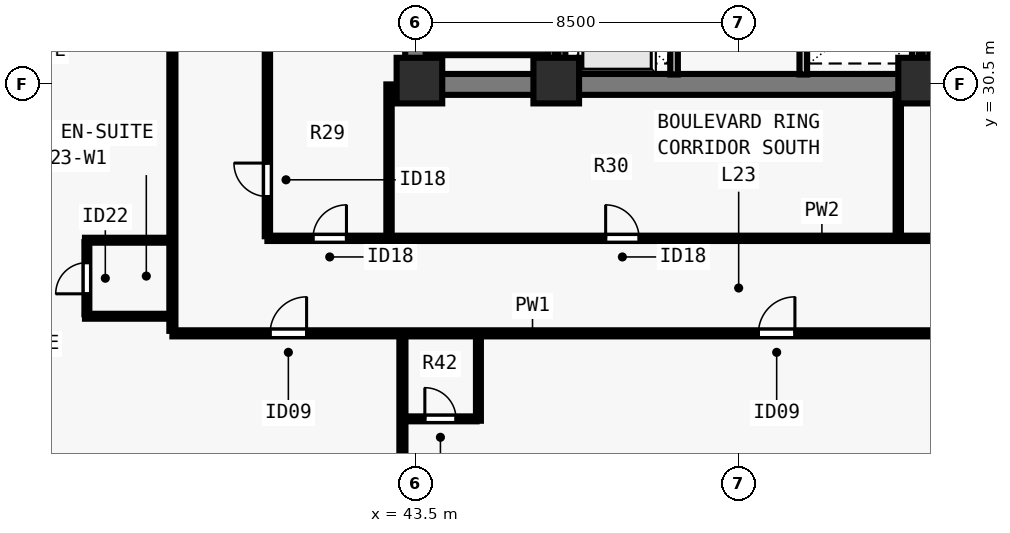
"""IFC4 building model, lengths in metres.
Left out: names, types, materials, properties, quantities, classifications, styles, units other than length and angle.
Written with IfcOpenShell. Run it as: python <this file> out.ifc"""

import sys

from ifc_helpers import new_model, si_unit, direction, frame, frame_2d, origin, origin_2d, place, context, subcontext, project, spatial, rectangle, extrude, element, fill, save


model = new_model("IFC4")
c1 = context("Model", 3, precision=1e-05, world=origin(), true_north=direction((0.0, 1.0)))
c2 = subcontext(c1, "Body", "Model", "MODEL_VIEW")
j1 = project(units=[si_unit("LENGTHUNIT", "METRE"), si_unit("PLANEANGLEUNIT", "RADIAN")], contexts=[c1])
p1 = place(None, origin())
s1 = spatial("IfcSite", under=j1, at=p1, CompositionType="ELEMENT")
p2 = place(p1, origin())
s2 = spatial("IfcBuilding", under=s1, at=p2, CompositionType="ELEMENT")
p3 = place(p2, frame((0.0, 0.0, 86.5)))
s3 = spatial("IfcBuildingStorey", under=s2, at=p3, CompositionType="ELEMENT", Elevation=86.5)
for number, where, z_axis, x_axis in (
    (1, (43.6, 30.6, 0.0), (0.0, 0.0, 1.0), (1.0, 0.0, 0.0)),
    (2, (47.2, 30.6, 0.0), (0.0, 0.0, 1.0), (1.0, 0.0, 0.0)),
    (3, (56.8, 30.6, 0.0), (0.0, 0.0, 1.0), (1.0, 0.0, 0.0)),
):
    element("IfcColumn", number, at=place(p3, frame(where, z_axis=z_axis, x_axis=x_axis)), inside=s3, PredefinedType="COLUMN", context=c2, shape_type="SweptSolid", body=[
        extrude(rectangle(XDim=1.2, YDim=1.2, at=origin_2d()), origin(), (0.0, 0.0, 1.0), 3.5),
    ])
p4 = place(p3, frame((43.225, 30.5, 0.0), z_axis=(0.0, 0.0, 1.0), x_axis=(1.0, 0.0, 0.0)))
e4 = element("IfcWall", 4, at=p4, inside=s3, PredefinedType="SHEAR", context=c2, shape_type="SweptSolid", body=[
    extrude(rectangle(XDim=17.55, YDim=0.55, at=frame_2d((8.775, 0.0))), origin(), (0.0, 0.0, 1.0), 3.28),
])
p5 = place(p3, frame((43.5, 30.765, 0.0), z_axis=(0.0, 0.0, 1.0), x_axis=(0.0, 1.0, 0.0)))
e5 = element("IfcWall", 5, at=p5, inside=s3, PredefinedType="SHEAR", context=c2, shape_type="SweptSolid", body=[
    extrude(rectangle(XDim=7.985, YDim=0.55, at=frame_2d((3.993, 0.0))), origin(), (0.0, 0.0, 1.0), 3.28),
])
p6 = place(p3, frame((50.3, 30.76, 0.0), z_axis=(0.0, 0.0, 1.0), x_axis=(0.0, 1.0, 0.0)))
e6 = element("IfcWall", 6, at=p6, inside=s3, PredefinedType="SOLIDWALL", context=c2, shape_type="SweptSolid", body=[
    extrude(rectangle(XDim=7.855, YDim=0.2, at=frame_2d((3.927, 0.0))), origin(), (0.0, 0.0, 1.0), 3.28),
])
p7 = place(p6, frame((0.79, 0.0, 0.0)))
e7 = element("IfcOpeningElement", 7, at=p7, cuts=e6, PredefinedType="OPENING", context=c2, shape_type="SweptSolid", body=[
    extrude(rectangle(XDim=1.1, YDim=2.2, at=frame_2d((0.55, 1.1))), frame((0.0, 0.11, 0.0), z_axis=(0.0, -1.0, 0.0), x_axis=(1.0, 0.0, 0.0)), (0.0, 0.0, 1.0), 0.22),
])
p8 = place(p6, frame((3.49, 0.0, 0.0)))
e8 = element("IfcOpeningElement", 8, at=p8, cuts=e6, PredefinedType="OPENING", context=c2, shape_type="SweptSolid", body=[
    extrude(rectangle(XDim=1.1, YDim=2.2, at=frame_2d((0.55, 1.1))), frame((0.0, 0.11, 0.0), z_axis=(0.0, -1.0, 0.0), x_axis=(1.0, 0.0, 0.0)), (0.0, 0.0, 1.0), 0.22),
])
p9 = place(p6, frame((6.19, 0.0, 0.0)))
e9 = element("IfcOpeningElement", 9, at=p9, cuts=e6, PredefinedType="OPENING", context=c2, shape_type="SweptSolid", body=[
    extrude(rectangle(XDim=1.1, YDim=2.2, at=frame_2d((0.55, 1.1))), frame((0.0, 0.11, 0.0), z_axis=(0.0, -1.0, 0.0), x_axis=(1.0, 0.0, 0.0)), (0.0, 0.0, 1.0), 0.22),
])
p10 = place(p3, frame((53.7, 30.76, 0.0), z_axis=(0.0, 0.0, 1.0), x_axis=(0.0, 1.0, 0.0)))
e10 = element("IfcWall", 10, at=p10, inside=s3, PredefinedType="SOLIDWALL", context=c2, shape_type="SweptSolid", body=[
    extrude(rectangle(XDim=7.855, YDim=0.2, at=frame_2d((3.927, 0.0))), origin(), (0.0, 0.0, 1.0), 3.28),
])
for number, where, z_axis, x_axis in (
    (11, (47.35, 30.76, 0.0), (0.0, 0.0, 1.0), (0.0, 1.0, 0.0)),
    (12, (56.65, 30.76, 0.0), (0.0, 0.0, 1.0), (0.0, 1.0, 0.0)),
):
    element("IfcWall", number, at=place(p3, frame(where, z_axis=z_axis, x_axis=x_axis)), inside=s3, PredefinedType="SOLIDWALL", context=c2, shape_type="SweptSolid", body=[
        extrude(rectangle(XDim=7.855, YDim=0.18, at=frame_2d((3.927, 0.0))), origin(), (0.0, 0.0, 1.0), 3.28),
    ])
p11 = place(p3, frame((37.1, 23.95, 0.0), z_axis=(0.0, 0.0, 1.0), x_axis=(1.0, 0.0, 0.0)))
e13 = element("IfcWall", 13, at=p11, inside=s3, PredefinedType="PARTITIONING", context=c2, shape_type="SweptSolid", body=[
    extrude(rectangle(XDim=29.8, YDim=0.16, at=frame_2d((14.9, 0.0))), origin(), (0.0, 0.0, 1.0), 3.28),
])
p12 = place(p11, frame((2.571, 0.0, 0.0)))
e14 = element("IfcOpeningElement", 14, at=p12, cuts=e13, PredefinedType="OPENING", context=c2, shape_type="SweptSolid", body=[
    extrude(rectangle(XDim=0.96, YDim=2.15, at=frame_2d((0.48, 1.075))), frame((0.0, 0.09, 0.0), z_axis=(0.0, -1.0, 0.0), x_axis=(1.0, 0.0, 0.0)), (0.0, 0.0, 1.0), 0.18),
])
p13 = place(p11, frame((15.42, 0.0, 0.0)))
e15 = element("IfcOpeningElement", 15, at=p13, cuts=e13, PredefinedType="OPENING", context=c2, shape_type="SweptSolid", body=[
    extrude(rectangle(XDim=0.96, YDim=2.15, at=frame_2d((0.48, 1.075))), frame((0.0, 0.09, 0.0), z_axis=(0.0, -1.0, 0.0), x_axis=(1.0, 0.0, 0.0)), (0.0, 0.0, 1.0), 0.18),
])
p14 = place(p11, frame((27.269, 0.0, 0.0)))
e16 = element("IfcOpeningElement", 16, at=p14, cuts=e13, PredefinedType="OPENING", context=c2, shape_type="SweptSolid", body=[
    extrude(rectangle(XDim=0.96, YDim=2.15, at=frame_2d((0.48, 1.075))), frame((0.0, 0.09, 0.0), z_axis=(0.0, -1.0, 0.0), x_axis=(1.0, 0.0, 0.0)), (0.0, 0.0, 1.0), 0.18),
])
p15 = place(p3, frame((37.1, 24.015, 0.0), z_axis=(0.0, 0.0, 1.0), x_axis=(0.0, 1.0, 0.0)))
e17 = element("IfcWall", 17, at=p15, inside=s3, PredefinedType="PARTITIONING", context=c2, shape_type="SweptSolid", body=[
    extrude(rectangle(XDim=29.97, YDim=0.16, at=frame_2d((14.985, 0.0))), origin(), (0.0, 0.0, 1.0), 3.28),
])
p16 = place(p15, frame((8.134, 0.0, 0.0)))
e18 = element("IfcOpeningElement", 18, at=p16, cuts=e17, PredefinedType="OPENING", context=c2, shape_type="SweptSolid", body=[
    extrude(rectangle(XDim=0.96, YDim=2.15, at=frame_2d((0.48, 1.075))), frame((0.0, 0.09, 0.0), z_axis=(0.0, -1.0, 0.0), x_axis=(1.0, 0.0, 0.0)), (0.0, 0.0, 1.0), 0.18),
])
p17 = place(p15, frame((22.934, 0.0, 0.0)))
e19 = element("IfcOpeningElement", 19, at=p17, cuts=e17, PredefinedType="OPENING", context=c2, shape_type="SweptSolid", body=[
    extrude(rectangle(XDim=0.96, YDim=2.15, at=frame_2d((0.48, 1.075))), frame((0.0, 0.09, 0.0), z_axis=(0.0, -1.0, 0.0), x_axis=(1.0, 0.0, 0.0)), (0.0, 0.0, 1.0), 0.18),
])
p18 = place(p3, frame((39.6, 26.45, 0.0), z_axis=(0.0, 0.0, 1.0), x_axis=(1.0, 0.0, 0.0)))
e20 = element("IfcWall", 20, at=p18, inside=s3, PredefinedType="PARTITIONING", context=c2, shape_type="SweptSolid", body=[
    extrude(rectangle(XDim=24.8, YDim=0.14, at=frame_2d((12.4, 0.0))), origin(), (0.0, 0.0, 1.0), 3.28),
])
p19 = place(p18, frame((1.2, 0.0, 0.0)))
e21 = element("IfcOpeningElement", 21, at=p19, cuts=e20, PredefinedType="OPENING", context=c2, shape_type="SweptSolid", body=[
    extrude(rectangle(XDim=0.88, YDim=2.1, at=frame_2d((0.44, 1.05))), frame((0.0, 0.08, 0.0), z_axis=(0.0, -1.0, 0.0), x_axis=(1.0, 0.0, 0.0)), (0.0, 0.0, 1.0), 0.16),
])
p20 = place(p18, frame((8.9, 0.0, 0.0)))
e22 = element("IfcOpeningElement", 22, at=p20, cuts=e20, PredefinedType="OPENING", context=c2, shape_type="SweptSolid", body=[
    extrude(rectangle(XDim=0.88, YDim=2.1, at=frame_2d((0.44, 1.05))), frame((0.0, 0.08, 0.0), z_axis=(0.0, -1.0, 0.0), x_axis=(1.0, 0.0, 0.0)), (0.0, 0.0, 1.0), 0.16),
])
p21 = place(p18, frame((19.4, 0.0, 0.0)))
e23 = element("IfcOpeningElement", 23, at=p21, cuts=e20, PredefinedType="OPENING", context=c2, shape_type="SweptSolid", body=[
    extrude(rectangle(XDim=0.88, YDim=2.1, at=frame_2d((0.44, 1.05))), frame((0.0, 0.08, 0.0), z_axis=(0.0, -1.0, 0.0), x_axis=(1.0, 0.0, 0.0)), (0.0, 0.0, 1.0), 0.16),
])
p22 = place(p3, frame((39.6, 26.505, 0.0), z_axis=(0.0, 0.0, 1.0), x_axis=(0.0, 1.0, 0.0)))
e24 = element("IfcWall", 24, at=p22, inside=s3, PredefinedType="PARTITIONING", context=c2, shape_type="SweptSolid", body=[
    extrude(rectangle(XDim=12.245, YDim=0.14, at=frame_2d((6.123, 0.0))), origin(), (0.0, 0.0, 1.0), 3.28),
])
p23 = place(p22, frame((1.045, 0.0, 0.0)))
e25 = element("IfcOpeningElement", 25, at=p23, cuts=e24, PredefinedType="OPENING", context=c2, shape_type="SweptSolid", body=[
    extrude(rectangle(XDim=0.88, YDim=2.1, at=frame_2d((0.44, 1.05))), frame((0.0, 0.08, 0.0), z_axis=(0.0, -1.0, 0.0), x_axis=(1.0, 0.0, 0.0)), (0.0, 0.0, 1.0), 0.16),
])
p24 = place(p22, frame((9.295, 0.0, 0.0)))
e26 = element("IfcOpeningElement", 26, at=p24, cuts=e24, PredefinedType="OPENING", context=c2, shape_type="SweptSolid", body=[
    extrude(rectangle(XDim=0.88, YDim=2.1, at=frame_2d((0.44, 1.05))), frame((0.0, 0.08, 0.0), z_axis=(0.0, -1.0, 0.0), x_axis=(1.0, 0.0, 0.0)), (0.0, 0.0, 1.0), 0.16),
])
p25 = place(p3, frame((42.8, 26.505, 0.0), z_axis=(0.0, 0.0, 1.0), x_axis=(0.0, 1.0, 0.0)))
e27 = element("IfcWall", 27, at=p25, inside=s3, PredefinedType="PARTITIONING", context=c2, shape_type="SweptSolid", body=[
    extrude(rectangle(XDim=3.995, YDim=0.14, at=frame_2d((1.998, 0.0))), origin(), (0.0, 0.0, 1.0), 2.439),
])
p26 = place(p3, frame((56.2, 26.505, 0.0), z_axis=(0.0, 0.0, 1.0), x_axis=(0.0, 1.0, 0.0)))
e28 = element("IfcWall", 28, at=p26, inside=s3, PredefinedType="PARTITIONING", context=c2, shape_type="SweptSolid", body=[
    extrude(rectangle(XDim=3.735, YDim=0.14, at=frame_2d((1.868, 0.0))), origin(), (0.0, 0.0, 1.0), 2.849),
])
p27 = place(p3, frame((43.153, 13.845, 0.0), z_axis=(0.0, 0.0, 1.0), x_axis=(0.0, 1.0, 0.0)))
e29 = element("IfcWall", 29, at=p27, inside=s3, PredefinedType="PARTITIONING", context=c2, shape_type="SweptSolid", body=[
    extrude(rectangle(XDim=10.04, YDim=0.16, at=frame_2d((5.02, 0.0))), origin(), (0.0, 0.0, 1.0), 3.28),
])
p28 = place(p3, frame((45.153, 21.65, 0.0), z_axis=(0.0, 0.0, 1.0), x_axis=(0.0, 1.0, 0.0)))
e30 = element("IfcWall", 30, at=p28, inside=s3, PredefinedType="PLUMBINGWALL", context=c2, shape_type="SweptSolid", body=[
    extrude(rectangle(XDim=2.235, YDim=0.13, at=frame_2d((1.118, 0.0))), origin(), (0.0, 0.0, 1.0), 3.28),
])
p29 = place(p3, frame((43.218, 21.7, 0.0), z_axis=(0.0, 0.0, 1.0), x_axis=(1.0, 0.0, 0.0)))
e31 = element("IfcWall", 31, at=p29, inside=s3, PredefinedType="PLUMBINGWALL", context=c2, shape_type="SweptSolid", body=[
    extrude(rectangle(XDim=1.885, YDim=0.13, at=frame_2d((0.942, 0.0))), origin(), (0.0, 0.0, 1.0), 3.28),
])
p30 = place(p29, frame((0.525, 0.0, 0.0)))
e32 = element("IfcOpeningElement", 32, at=p30, cuts=e31, PredefinedType="OPENING", context=c2, shape_type="SweptSolid", body=[
    extrude(rectangle(XDim=0.82, YDim=2.1, at=frame_2d((0.41, 1.05))), frame((0.0, 0.075, 0.0), z_axis=(0.0, -1.0, 0.0), x_axis=(1.0, 0.0, 0.0)), (0.0, 0.0, 1.0), 0.15),
])
p31 = place(p3, frame((34.8, 24.4, 0.0), z_axis=(0.0, 0.0, 1.0), x_axis=(1.0, 0.0, 0.0)))
e33 = element("IfcWall", 33, at=p31, inside=s3, PredefinedType="PLUMBINGWALL", context=c2, shape_type="SweptSolid", body=[
    extrude(rectangle(XDim=2.235, YDim=0.13, at=frame_2d((1.117, 0.0))), origin(), (0.0, 0.0, 1.0), 2.849),
])
p32 = place(p3, frame((34.8, 26.4, 0.0), z_axis=(0.0, 0.0, 1.0), x_axis=(1.0, 0.0, 0.0)))
e34 = element("IfcWall", 34, at=p32, inside=s3, PredefinedType="PLUMBINGWALL", context=c2, shape_type="SweptSolid", body=[
    extrude(rectangle(XDim=2.235, YDim=0.13, at=frame_2d((1.117, 0.0))), origin(), (0.0, 0.0, 1.0), 3.28),
])
p33 = place(p3, frame((34.85, 24.45, 0.0), z_axis=(0.0, 0.0, 1.0), x_axis=(0.0, 1.0, 0.0)))
e35 = element("IfcWall", 35, at=p33, inside=s3, PredefinedType="PLUMBINGWALL", context=c2, shape_type="SweptSolid", body=[
    extrude(rectangle(XDim=1.9, YDim=0.13, at=frame_2d((0.95, 0.0))), origin(), (0.0, 0.0, 1.0), 3.28),
])
p34 = place(p33, frame((0.54, 0.0, 0.0)))
e36 = element("IfcOpeningElement", 36, at=p34, cuts=e35, PredefinedType="OPENING", context=c2, shape_type="SweptSolid", body=[
    extrude(rectangle(XDim=0.82, YDim=2.1, at=frame_2d((0.41, 1.05))), frame((0.0, 0.075, 0.0), z_axis=(0.0, -1.0, 0.0), x_axis=(1.0, 0.0, 0.0)), (0.0, 0.0, 1.0), 0.15),
])
p35 = place(p3, frame((43.765, 31.36, 0.0), z_axis=(0.0, 0.0, 1.0), x_axis=(1.0, 0.0, 0.0)))
e37 = element("IfcWall", 37, at=p35, inside=s3, PredefinedType="SOLIDWALL", context=c2, shape_type="SweptSolid", body=[
    extrude(rectangle(XDim=3.23, YDim=0.18, at=frame_2d((1.615, 0.0))), origin(), (0.0, 0.0, 1.0), 3.28),
])
p36 = place(p3, frame((47.07, 38.78, 0.0), z_axis=(0.0, 0.0, 1.0), x_axis=(0.0, -1.0, 0.0)))
e38 = element("IfcWall", 38, at=p36, inside=s3, PredefinedType="SOLIDWALL", context=c2, shape_type="SweptSolid", body=[
    extrude(rectangle(XDim=8.017, YDim=0.18, at=frame_2d((4.009, 0.0))), origin(), (0.0, 0.0, 1.0), 3.28),
])
p37 = place(p3, frame((57.005, 31.36, 0.0), z_axis=(0.0, 0.0, 1.0), x_axis=(1.0, 0.0, 0.0)))
e39 = element("IfcWall", 39, at=p37, inside=s3, PredefinedType="SOLIDWALL", context=c2, shape_type="SweptSolid", body=[
    extrude(rectangle(XDim=3.23, YDim=0.18, at=frame_2d((1.615, 0.0))), origin(), (0.0, 0.0, 1.0), 3.28),
])
p38 = place(p3, frame((56.93, 38.78, 0.0), z_axis=(0.0, 0.0, 1.0), x_axis=(0.0, -1.0, 0.0)))
e40 = element("IfcWall", 40, at=p38, inside=s3, PredefinedType="SOLIDWALL", context=c2, shape_type="SweptSolid", body=[
    extrude(rectangle(XDim=8.017, YDim=0.18, at=frame_2d((4.009, 0.0))), origin(), (0.0, 0.0, 1.0), 3.28),
])
p39 = place(p19, origin())
e41 = element("IfcDoor", 41, at=p39, inside=s3, OperationType="SINGLE_SWING_RIGHT", PredefinedType="DOOR", context=c2, shape_type="SweptSolid", body=[
    extrude(rectangle(XDim=0.88, YDim=2.1, at=frame_2d((0.44, 1.05))), frame((0.0, 0.025, 0.0), z_axis=(0.0, -1.0, 0.0), x_axis=(1.0, 0.0, 0.0)), (0.0, 0.0, 1.0), 0.05),
])
fill(e21, e41)
p40 = place(p20, origin())
e42 = element("IfcDoor", 42, at=p40, inside=s3, OperationType="SINGLE_SWING_LEFT", PredefinedType="DOOR", context=c2, shape_type="SweptSolid", body=[
    extrude(rectangle(XDim=0.88, YDim=2.1, at=frame_2d((0.44, 1.05))), frame((0.0, 0.025, 0.0), z_axis=(0.0, -1.0, 0.0), x_axis=(1.0, 0.0, 0.0)), (0.0, 0.0, 1.0), 0.05),
])
fill(e22, e42)
p41 = place(p23, origin())
e43 = element("IfcDoor", 43, at=p41, inside=s3, OperationType="SINGLE_SWING_RIGHT", PredefinedType="DOOR", context=c2, shape_type="SweptSolid", body=[
    extrude(rectangle(XDim=0.88, YDim=2.1, at=frame_2d((0.44, 1.05))), frame((0.0, 0.025, 0.0), z_axis=(0.0, -1.0, 0.0), x_axis=(1.0, 0.0, 0.0)), (0.0, 0.0, 1.0), 0.05),
])
fill(e25, e43)
p42 = place(p12, origin())
e44 = element("IfcDoor", 44, at=p42, inside=s3, OperationType="SINGLE_SWING_RIGHT", PredefinedType="DOOR", context=c2, shape_type="SweptSolid", body=[
    extrude(rectangle(XDim=0.96, YDim=2.15, at=frame_2d((0.48, 1.075))), frame((0.0, 0.025, 0.0), z_axis=(0.0, -1.0, 0.0), x_axis=(1.0, 0.0, 0.0)), (0.0, 0.0, 1.0), 0.05),
])
fill(e14, e44)
p43 = place(p30, origin())
e45 = element("IfcDoor", 45, at=p43, inside=s3, OperationType="SINGLE_SWING_LEFT", PredefinedType="DOOR", context=c2, shape_type="SweptSolid", body=[
    extrude(rectangle(XDim=0.82, YDim=2.1, at=frame_2d((0.41, 1.05))), frame((0.0, 0.025, 0.0), z_axis=(0.0, -1.0, 0.0), x_axis=(1.0, 0.0, 0.0)), (0.0, 0.0, 1.0), 0.05),
])
fill(e32, e45)
p44 = place(p13, origin())
e46 = element("IfcDoor", 46, at=p44, inside=s3, OperationType="SINGLE_SWING_RIGHT", PredefinedType="DOOR", context=c2, shape_type="SweptSolid", body=[
    extrude(rectangle(XDim=0.96, YDim=2.15, at=frame_2d((0.48, 1.075))), frame((0.0, 0.025, 0.0), z_axis=(0.0, -1.0, 0.0), x_axis=(1.0, 0.0, 0.0)), (0.0, 0.0, 1.0), 0.05),
])
fill(e15, e46)
p45 = place(p34, origin())
e47 = element("IfcDoor", 47, at=p45, inside=s3, OperationType="SINGLE_SWING_LEFT", PredefinedType="DOOR", context=c2, shape_type="SweptSolid", body=[
    extrude(rectangle(XDim=0.82, YDim=2.1, at=frame_2d((0.41, 1.05))), frame((0.0, 0.025, 0.0), z_axis=(0.0, -1.0, 0.0), x_axis=(1.0, 0.0, 0.0)), (0.0, 0.0, 1.0), 0.05),
])
fill(e36, e47)
save(model, sys.argv[1])
